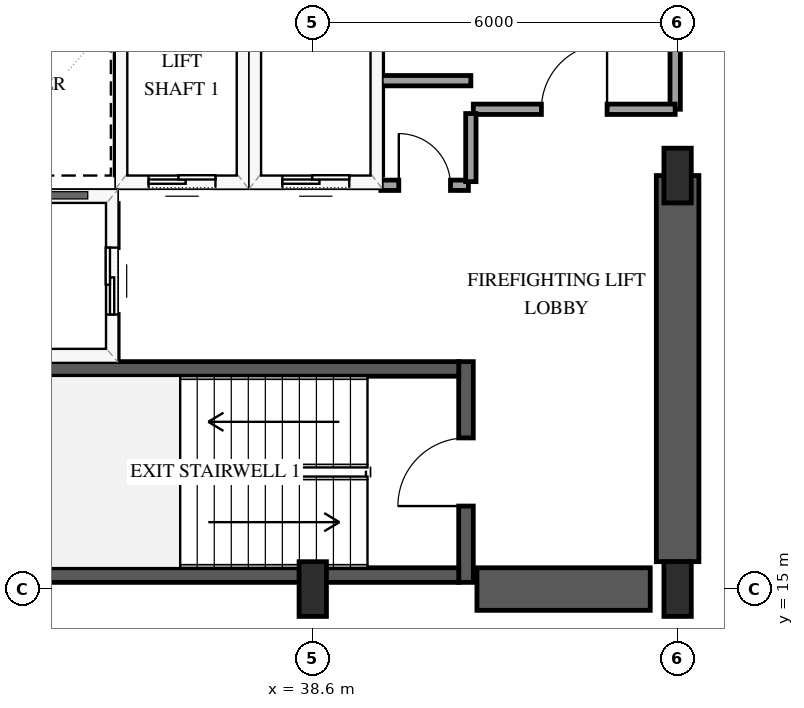
"""IFC4 building model, lengths in metres.
Left out: names, types, materials, properties, quantities, classifications, styles, units other than length and angle.
Written with IfcOpenShell. Run it as: python <this file> out.ifc"""

import sys

from ifc_helpers import new_model, si_unit, direction, frame, frame_2d, origin, origin_2d, place, context, subcontext, project, spatial, rectangle, extrude, element, fill, save


model = new_model("IFC4")
c1 = context("Model", 3, precision=1e-05, world=origin(), true_north=direction((0.0, 1.0)))
c2 = subcontext(c1, "Body", "Model", "MODEL_VIEW")
j1 = project(units=[si_unit("LENGTHUNIT", "METRE"), si_unit("PLANEANGLEUNIT", "RADIAN")], contexts=[c1])
p1 = place(None, origin())
s1 = spatial("IfcSite", under=j1, at=p1, CompositionType="ELEMENT")
p2 = place(p1, origin())
s2 = spatial("IfcBuilding", under=s1, at=p2, CompositionType="ELEMENT")
p3 = place(p2, frame((0.0, 0.0, 74.6)))
s3 = spatial("IfcBuildingStorey", under=s2, at=p3, CompositionType="ELEMENT", Elevation=74.6)
p4 = place(p3, frame((41.12, 15.11, 0.0), z_axis=(0.0, 0.0, 1.0), x_axis=(0.0, 1.0, 0.0)))
e1 = element("IfcWall", 1, at=p4, inside=s3, PredefinedType="SHEAR", context=c2, shape_type="SweptSolid", body=[
    extrude(rectangle(XDim=3.63, YDim=0.24, at=frame_2d((1.815, 0.0))), origin(), (0.0, 0.0, 1.0), 4.0),
])
p5 = place(p4, frame((1.255, 0.0, 0.0)))
e2 = element("IfcOpeningElement", 2, at=p5, cuts=e1, PredefinedType="OPENING", context=c2, shape_type="SweptSolid", body=[
    extrude(rectangle(XDim=1.12, YDim=2.15, at=frame_2d((0.56, 1.075))), frame((0.0, 0.13, 0.0), z_axis=(0.0, -1.0, 0.0), x_axis=(1.0, 0.0, 0.0)), (0.0, 0.0, 1.0), 0.26),
])
for number, where, z_axis, x_axis in (
    (3, (33.0, 15.23, 0.0), (0.0, 0.0, 1.0), (1.0, 0.0, 0.0)),
    (4, (33.0, 18.62, 0.0), (0.0, 0.0, 1.0), (1.0, 0.0, 0.0)),
):
    element("IfcWall", number, at=place(p3, frame(where, z_axis=z_axis, x_axis=x_axis)), inside=s3, PredefinedType="SHEAR", context=c2, shape_type="SweptSolid", body=[
        extrude(rectangle(XDim=8.0, YDim=0.24, at=frame_2d((4.0, 0.0))), origin(), (0.0, 0.0, 1.0), 4.0),
    ])
p6 = place(p3, frame((41.3, 15.0, 0.0), z_axis=(0.0, 0.0, 1.0), x_axis=(1.0, 0.0, 0.0)))
e5 = element("IfcWall", 5, at=p6, inside=s3, PredefinedType="SHEAR", context=c2, shape_type="SweptSolid", body=[
    extrude(rectangle(XDim=2.85, YDim=0.7, at=frame_2d((1.425, 0.0))), origin(), (0.0, 0.0, 1.0), 4.0),
])
p7 = place(p3, frame((44.6, 15.45, 0.0), z_axis=(0.0, 0.0, 1.0), x_axis=(0.0, 1.0, 0.0)))
e6 = element("IfcWall", 6, at=p7, inside=s3, PredefinedType="SHEAR", context=c2, shape_type="SweptSolid", body=[
    extrude(rectangle(XDim=6.35, YDim=0.7, at=frame_2d((3.175, 0.0))), origin(), (0.0, 0.0, 1.0), 4.0),
])
for number, where, z_axis, x_axis in (
    (7, (38.6, 15.0, 0.0), (0.0, 0.0, 1.0), (1.0, 0.0, 0.0)),
    (8, (44.6, 15.0, 0.0), (0.0, 0.0, 1.0), (1.0, 0.0, 0.0)),
    (9, (44.6, 21.8, 0.0), (0.0, 0.0, 1.0), (1.0, 0.0, 0.0)),
):
    element("IfcColumn", number, at=place(p3, frame(where, z_axis=z_axis, x_axis=x_axis)), inside=s3, PredefinedType="PILASTER", context=c2, shape_type="SweptSolid", body=[
        extrude(rectangle(XDim=0.45, YDim=0.9, at=origin_2d()), origin(), (0.0, 0.0, 1.0), 4.0),
    ])
p8 = place(p3, frame((35.45, 21.7, 0.0), z_axis=(0.0, 0.0, 1.0), x_axis=(1.0, 0.0, 0.0)))
e10 = element("IfcWall", 10, at=p8, inside=s3, PredefinedType="SOLIDWALL", context=c2, shape_type="SweptSolid", body=[
    extrude(rectangle(XDim=2.0, YDim=0.2, at=frame_2d((1.0, 0.0))), origin(), (0.0, 0.0, 1.0), 3.7),
])
p9 = place(p8, frame((0.45, 0.0, 0.0)))
e11 = element("IfcOpeningElement", 11, at=p9, cuts=e10, PredefinedType="OPENING", context=c2, shape_type="SweptSolid", body=[
    extrude(rectangle(XDim=1.1, YDim=2.15, at=frame_2d((0.55, 1.075))), frame((0.0, 0.11, 0.0), z_axis=(0.0, -1.0, 0.0), x_axis=(1.0, 0.0, 0.0)), (0.0, 0.0, 1.0), 0.22),
])
for number, where, z_axis, x_axis in (
    (12, (35.45, 21.81, 0.0), (0.0, 0.0, 1.0), (0.0, 1.0, 0.0)),
    (13, (37.45, 21.81, 0.0), (0.0, 0.0, 1.0), (0.0, 1.0, 0.0)),
):
    element("IfcWall", number, at=place(p3, frame(where, z_axis=z_axis, x_axis=x_axis)), inside=s3, PredefinedType="SOLIDWALL", context=c2, shape_type="SweptSolid", body=[
        extrude(rectangle(XDim=2.38, YDim=0.2, at=frame_2d((1.19, 0.0))), origin(), (0.0, 0.0, 1.0), 3.7),
    ])
p10 = place(p3, frame((37.65, 21.7, 0.0), z_axis=(0.0, 0.0, 1.0), x_axis=(1.0, 0.0, 0.0)))
e14 = element("IfcWall", 14, at=p10, inside=s3, PredefinedType="SOLIDWALL", context=c2, shape_type="SweptSolid", body=[
    extrude(rectangle(XDim=2.0, YDim=0.2, at=frame_2d((1.0, 0.0))), origin(), (0.0, 0.0, 1.0), 3.7),
])
p11 = place(p10, frame((0.45, 0.0, 0.0)))
e15 = element("IfcOpeningElement", 15, at=p11, cuts=e14, PredefinedType="OPENING", context=c2, shape_type="SweptSolid", body=[
    extrude(rectangle(XDim=1.1, YDim=2.15, at=frame_2d((0.55, 1.075))), frame((0.0, 0.11, 0.0), z_axis=(0.0, -1.0, 0.0), x_axis=(1.0, 0.0, 0.0)), (0.0, 0.0, 1.0), 0.22),
])
p12 = place(p3, frame((39.65, 21.81, 0.0), z_axis=(0.0, 0.0, 1.0), x_axis=(0.0, 1.0, 0.0)))
e16 = element("IfcWall", 16, at=p12, inside=s3, PredefinedType="SOLIDWALL", context=c2, shape_type="SweptSolid", body=[
    extrude(rectangle(XDim=2.38, YDim=0.2, at=frame_2d((1.19, 0.0))), origin(), (0.0, 0.0, 1.0), 3.7),
])
p13 = place(p3, frame((32.72, 21.45, 0.0), z_axis=(0.0, 0.0, 1.0), x_axis=(1.0, 0.0, 0.0)))
e17 = element("IfcWall", 17, at=p13, inside=s3, PredefinedType="SOLIDWALL", context=c2, shape_type="SweptSolid", body=[
    extrude(rectangle(XDim=2.58, YDim=0.2, at=frame_2d((1.29, 0.0))), origin(), (0.0, 0.0, 1.0), 3.7),
])
p14 = place(p3, frame((35.3, 18.79, 0.0), z_axis=(0.0, 0.0, 1.0), x_axis=(0.0, 1.0, 0.0)))
e18 = element("IfcWall", 18, at=p14, inside=s3, PredefinedType="SOLIDWALL", context=c2, shape_type="SweptSolid", body=[
    extrude(rectangle(XDim=2.55, YDim=0.2, at=frame_2d((1.275, 0.0))), origin(), (0.0, 0.0, 1.0), 3.7),
])
p15 = place(p14, frame((0.725, 0.0, 0.0)))
e19 = element("IfcOpeningElement", 19, at=p15, cuts=e18, PredefinedType="OPENING", context=c2, shape_type="SweptSolid", body=[
    extrude(rectangle(XDim=1.1, YDim=2.15, at=frame_2d((0.55, 1.075))), frame((0.0, 0.11, 0.0), z_axis=(0.0, -1.0, 0.0), x_axis=(1.0, 0.0, 0.0)), (0.0, 0.0, 1.0), 0.22),
])
p16 = place(p3, frame((44.56, 29.8, 0.0), z_axis=(0.0, 0.0, 1.0), x_axis=(0.0, -1.0, 0.0)))
e20 = element("IfcWall", 20, at=p16, inside=s3, PredefinedType="PARTITIONING", context=c2, shape_type="SweptSolid", body=[
    extrude(rectangle(XDim=6.91, YDim=0.17, at=frame_2d((3.455, 0.0))), origin(), (0.0, 0.0, 1.0), 2.74),
])
p17 = place(p16, frame((2.915, 0.0, 0.0)))
e21 = element("IfcOpeningElement", 21, at=p17, cuts=e20, PredefinedType="OPENING", context=c2, shape_type="SweptSolid", body=[
    extrude(rectangle(XDim=1.08, YDim=2.15, at=frame_2d((0.54, 1.075))), frame((0.0, 0.095, 0.0), z_axis=(0.0, -1.0, 0.0), x_axis=(1.0, 0.0, 0.0)), (0.0, 0.0, 1.0), 0.19),
])
p18 = place(p3, frame((41.24, 22.89, 0.0), z_axis=(0.0, 0.0, 1.0), x_axis=(1.0, 0.0, 0.0)))
e22 = element("IfcWall", 22, at=p18, inside=s3, PredefinedType="PARTITIONING", context=c2, shape_type="SweptSolid", body=[
    extrude(rectangle(XDim=3.32, YDim=0.17, at=frame_2d((1.66, 0.0))), origin(), (0.0, 0.0, 1.0), 3.7),
])
p19 = place(p18, frame((1.12, 0.0, 0.0)))
e23 = element("IfcOpeningElement", 23, at=p19, cuts=e22, PredefinedType="OPENING", context=c2, shape_type="SweptSolid", body=[
    extrude(rectangle(XDim=1.08, YDim=2.15, at=frame_2d((0.54, 1.075))), frame((0.0, 0.095, 0.0), z_axis=(0.0, -1.0, 0.0), x_axis=(1.0, 0.0, 0.0)), (0.0, 0.0, 1.0), 0.19),
])
p20 = place(p3, frame((39.72, 21.64, 0.0), z_axis=(0.0, 0.0, 1.0), x_axis=(1.0, 0.0, 0.0)))
e24 = element("IfcWall", 24, at=p20, inside=s3, PredefinedType="PARTITIONING", context=c2, shape_type="SweptSolid", body=[
    extrude(rectangle(XDim=1.44, YDim=0.17, at=frame_2d((0.72, 0.0))), origin(), (0.0, 0.0, 1.0), 3.7),
])
p21 = place(p20, frame((0.295, 0.0, 0.0)))
e25 = element("IfcOpeningElement", 25, at=p21, cuts=e24, PredefinedType="OPENING", context=c2, shape_type="SweptSolid", body=[
    extrude(rectangle(XDim=0.85, YDim=2.1, at=frame_2d((0.425, 1.05))), frame((0.0, 0.095, 0.0), z_axis=(0.0, -1.0, 0.0), x_axis=(1.0, 0.0, 0.0)), (0.0, 0.0, 1.0), 0.19),
])
p22 = place(p3, frame((41.2, 21.7, 0.0), z_axis=(0.0, 0.0, 1.0), x_axis=(0.0, 1.0, 0.0)))
e26 = element("IfcWall", 26, at=p22, inside=s3, PredefinedType="PARTITIONING", context=c2, shape_type="SweptSolid", body=[
    extrude(rectangle(XDim=1.12, YDim=0.17, at=frame_2d((0.56, 0.0))), origin(), (0.0, 0.0, 1.0), 3.7),
])
p23 = place(p3, frame((41.2, 23.36, 0.0), z_axis=(0.0, 0.0, 1.0), x_axis=(-1.0, 0.0, 0.0)))
e27 = element("IfcWall", 27, at=p23, inside=s3, PredefinedType="PARTITIONING", context=c2, shape_type="SweptSolid", body=[
    extrude(rectangle(XDim=1.48, YDim=0.17, at=frame_2d((0.74, 0.0))), origin(), (0.0, 0.0, 1.0), 3.7),
])
p24 = place(p9, origin())
e28 = element("IfcDoor", 28, at=p24, inside=s3, OperationType="SLIDING_TO_LEFT", PredefinedType="DOOR", context=c2, shape_type="SweptSolid", body=[
    extrude(rectangle(XDim=1.1, YDim=2.15, at=frame_2d((0.55, 1.075))), frame((0.0, 0.025, 0.0), z_axis=(0.0, -1.0, 0.0), x_axis=(1.0, 0.0, 0.0)), (0.0, 0.0, 1.0), 0.05),
])
fill(e11, e28)
p25 = place(p11, origin())
e29 = element("IfcDoor", 29, at=p25, inside=s3, OperationType="SLIDING_TO_LEFT", PredefinedType="DOOR", context=c2, shape_type="SweptSolid", body=[
    extrude(rectangle(XDim=1.1, YDim=2.15, at=frame_2d((0.55, 1.075))), frame((0.0, 0.025, 0.0), z_axis=(0.0, -1.0, 0.0), x_axis=(1.0, 0.0, 0.0)), (0.0, 0.0, 1.0), 0.05),
])
fill(e15, e29)
p26 = place(p15, origin())
e30 = element("IfcDoor", 30, at=p26, inside=s3, OperationType="SLIDING_TO_LEFT", PredefinedType="DOOR", context=c2, shape_type="SweptSolid", body=[
    extrude(rectangle(XDim=1.1, YDim=2.15, at=frame_2d((0.55, 1.075))), frame((0.0, 0.025, 0.0), z_axis=(0.0, -1.0, 0.0), x_axis=(1.0, 0.0, 0.0)), (0.0, 0.0, 1.0), 0.05),
])
fill(e19, e30)
p27 = place(p5, origin())
e31 = element("IfcDoor", 31, at=p27, inside=s3, OperationType="SINGLE_SWING_LEFT", PredefinedType="DOOR", context=c2, shape_type="SweptSolid", body=[
    extrude(rectangle(XDim=1.12, YDim=2.15, at=frame_2d((0.56, 1.075))), frame((0.0, 0.025, 0.0), z_axis=(0.0, -1.0, 0.0), x_axis=(1.0, 0.0, 0.0)), (0.0, 0.0, 1.0), 0.05),
])
fill(e2, e31)
p28 = place(p19, origin())
e32 = element("IfcDoor", 32, at=p28, inside=s3, OperationType="SINGLE_SWING_RIGHT", PredefinedType="DOOR", context=c2, shape_type="SweptSolid", body=[
    extrude(rectangle(XDim=1.08, YDim=2.15, at=frame_2d((0.54, 1.075))), frame((0.0, 0.025, 0.0), z_axis=(0.0, -1.0, 0.0), x_axis=(1.0, 0.0, 0.0)), (0.0, 0.0, 1.0), 0.05),
])
fill(e23, e32)
p29 = place(p21, origin())
e33 = element("IfcDoor", 33, at=p29, inside=s3, OperationType="SINGLE_SWING_LEFT", PredefinedType="DOOR", context=c2, shape_type="SweptSolid", body=[
    extrude(rectangle(XDim=0.85, YDim=2.1, at=frame_2d((0.425, 1.05))), frame((0.0, 0.025, 0.0), z_axis=(0.0, -1.0, 0.0), x_axis=(1.0, 0.0, 0.0)), (0.0, 0.0, 1.0), 0.05),
])
fill(e25, e33)
save(model, sys.argv[1])
